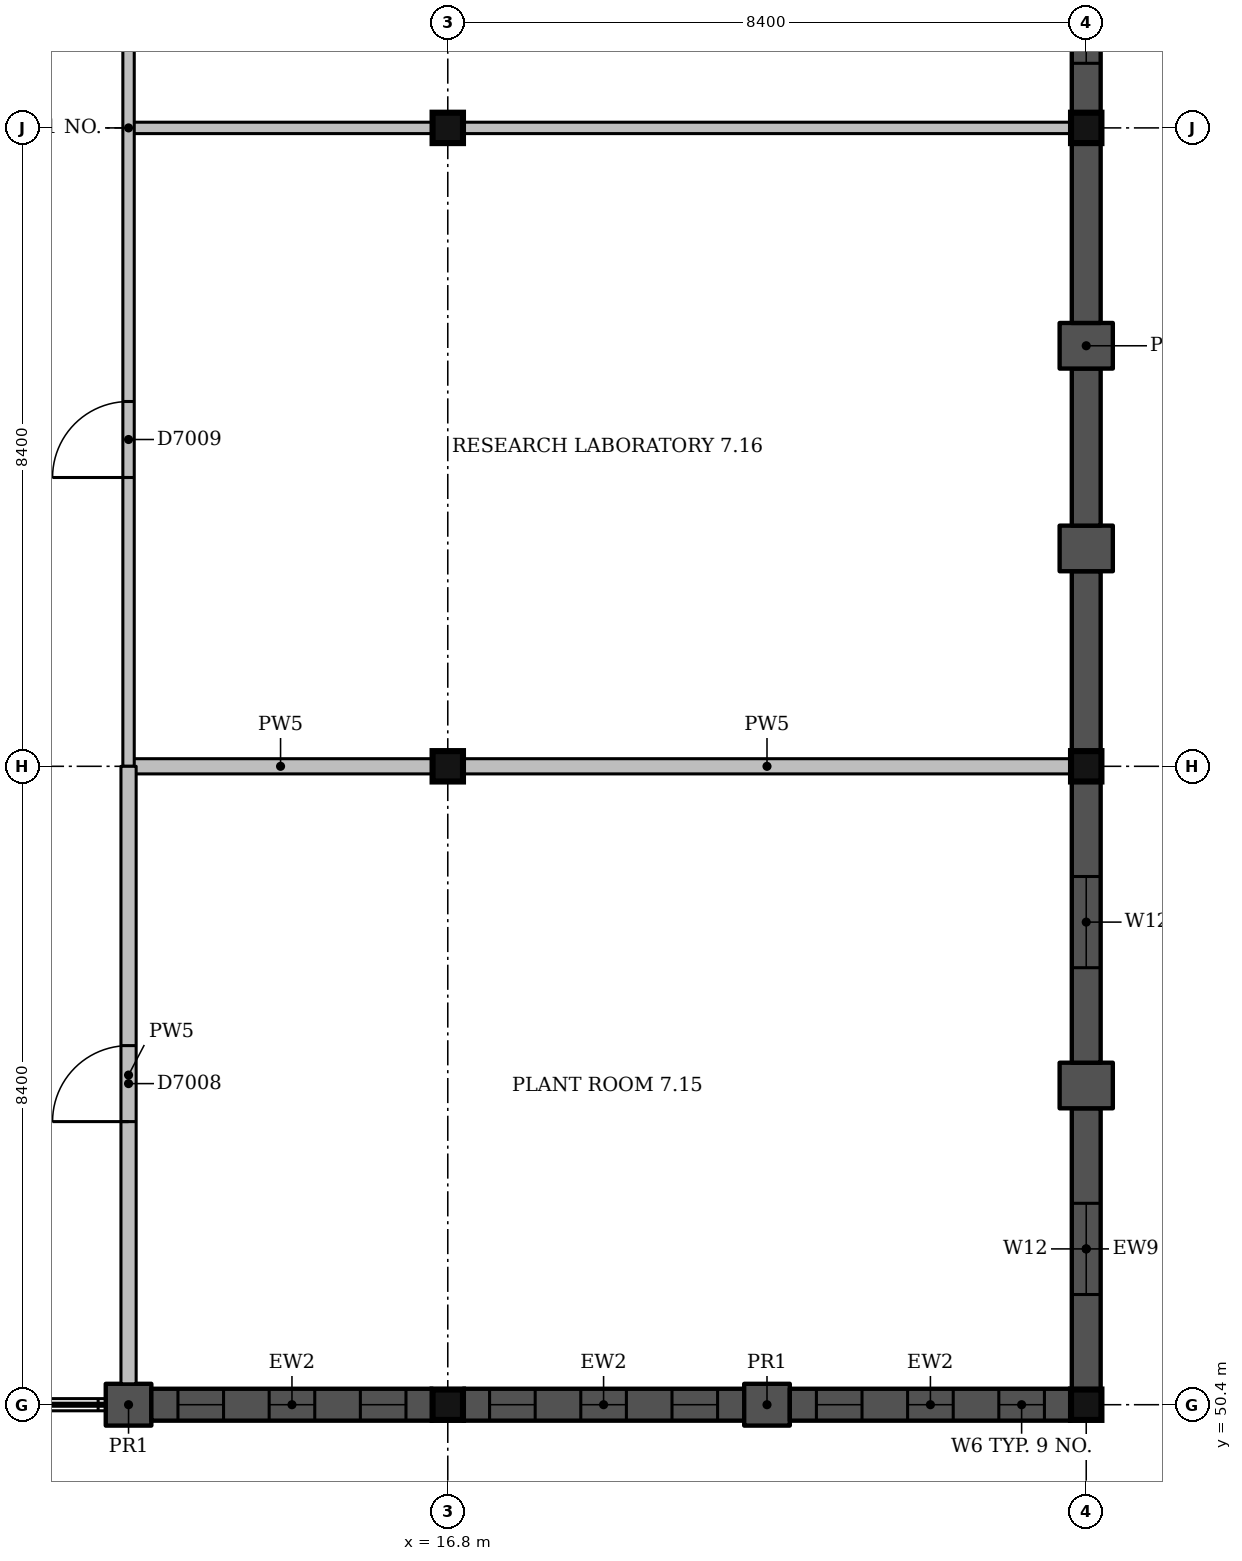
"""IFC4 building model, lengths in metres.
Left out: names, types, materials, properties, quantities, classifications, styles, units other than length and angle.
Written with IfcOpenShell. Run it as: python <this file> out.ifc"""

import sys

from ifc_helpers import new_model, si_unit, direction, frame, frame_2d, origin, origin_2d, place, context, subcontext, project, spatial, rectangle, extrude, element, fill, save


model = new_model("IFC4")
c1 = context("Model", 3, precision=1e-05, world=origin(), true_north=direction((0.0, 1.0)))
c2 = subcontext(c1, "Body", "Model", "MODEL_VIEW")
j1 = project(units=[si_unit("LENGTHUNIT", "METRE"), si_unit("PLANEANGLEUNIT", "RADIAN")], contexts=[c1])
p1 = place(None, origin())
s1 = spatial("IfcSite", under=j1, at=p1, CompositionType="ELEMENT")
p2 = place(p1, origin())
s2 = spatial("IfcBuilding", under=s1, at=p2, CompositionType="ELEMENT")
p3 = place(p2, frame((0.0, 0.0, 31.5)))
s3 = spatial("IfcBuildingStorey", under=s2, at=p3, CompositionType="ELEMENT", Elevation=31.5)
for number, where, z_axis, x_axis in (
    (1, (16.8, 50.4, 0.0), (0.0, 0.0, 1.0), (1.0, 0.0, 0.0)),
    (2, (16.8, 58.8, 0.0), (0.0, 0.0, 1.0), (1.0, 0.0, 0.0)),
    (3, (16.8, 67.2, 0.0), (0.0, 0.0, 1.0), (1.0, 0.0, 0.0)),
    (4, (25.2, 50.4, 0.0), (0.0, 0.0, 1.0), (1.0, 0.0, 0.0)),
    (5, (25.2, 58.8, 0.0), (0.0, 0.0, 1.0), (1.0, 0.0, 0.0)),
    (6, (25.2, 67.2, 0.0), (0.0, 0.0, 1.0), (1.0, 0.0, 0.0)),
):
    element("IfcColumn", number, at=place(p3, frame(where, z_axis=z_axis, x_axis=x_axis)), inside=s3, PredefinedType="COLUMN", context=c2, shape_type="SweptSolid", body=[
        extrude(rectangle(XDim=0.4, YDim=0.4, at=origin_2d()), origin(), (0.0, 0.0, 1.0), 4.5),
    ])
p4 = place(p3, frame((25.2, 50.6, 0.0), z_axis=(0.0, 0.0, 1.0), x_axis=(0.0, 1.0, 0.0)))
e7 = element("IfcWall", 7, at=p4, inside=s3, PredefinedType="SOLIDWALL", context=c2, shape_type="SweptSolid", body=[
    extrude(rectangle(XDim=3.7, YDim=0.38, at=frame_2d((1.85, 0.0))), origin(), (0.0, 0.0, 1.0), 4.2),
])
p5 = place(p4, frame((1.25, 0.0, 2.4)))
e8 = element("IfcOpeningElement", 8, at=p5, cuts=e7, PredefinedType="OPENING", context=c2, shape_type="SweptSolid", body=[
    extrude(rectangle(XDim=1.2, YDim=0.6, at=frame_2d((0.6, 0.3))), frame((0.0, 0.2, 0.0), z_axis=(0.0, -1.0, 0.0), x_axis=(1.0, 0.0, 0.0)), (0.0, 0.0, 1.0), 0.4),
])
p6 = place(p3, frame((25.2, 54.3, 0.0), z_axis=(0.0, 0.0, 1.0), x_axis=(0.0, 1.0, 0.0)))
e9 = element("IfcWall", 9, at=p6, inside=s3, PredefinedType="SOLIDWALL", context=c2, shape_type="SweptSolid", body=[
    extrude(rectangle(XDim=0.6, YDim=0.7, at=frame_2d((0.3, 0.0))), origin(), (0.0, 0.0, 1.0), 4.2),
])
p7 = place(p3, frame((25.2, 54.9, 0.0), z_axis=(0.0, 0.0, 1.0), x_axis=(0.0, 1.0, 0.0)))
e10 = element("IfcWall", 10, at=p7, inside=s3, PredefinedType="SOLIDWALL", context=c2, shape_type="SweptSolid", body=[
    extrude(rectangle(XDim=3.7, YDim=0.38, at=frame_2d((1.85, 0.0))), origin(), (0.0, 0.0, 1.0), 4.2),
])
p8 = place(p7, frame((1.25, 0.0, 2.4)))
e11 = element("IfcOpeningElement", 11, at=p8, cuts=e10, PredefinedType="OPENING", context=c2, shape_type="SweptSolid", body=[
    extrude(rectangle(XDim=1.2, YDim=0.6, at=frame_2d((0.6, 0.3))), frame((0.0, 0.2, 0.0), z_axis=(0.0, -1.0, 0.0), x_axis=(1.0, 0.0, 0.0)), (0.0, 0.0, 1.0), 0.4),
])
p9 = place(p3, frame((25.2, 59.0, 0.0), z_axis=(0.0, 0.0, 1.0), x_axis=(0.0, 1.0, 0.0)))
e12 = element("IfcWall", 12, at=p9, inside=s3, PredefinedType="SOLIDWALL", context=c2, shape_type="SweptSolid", body=[
    extrude(rectangle(XDim=2.367, YDim=0.38, at=frame_2d((1.183, 0.0))), origin(), (0.0, 0.0, 1.0), 3.6),
])
p10 = place(p3, frame((25.2, 61.367, 0.0), z_axis=(0.0, 0.0, 1.0), x_axis=(0.0, 1.0, 0.0)))
e13 = element("IfcWall", 13, at=p10, inside=s3, PredefinedType="SOLIDWALL", context=c2, shape_type="SweptSolid", body=[
    extrude(rectangle(XDim=0.6, YDim=0.7, at=frame_2d((0.3, 0.0))), origin(), (0.0, 0.0, 1.0), 3.6),
])
p11 = place(p3, frame((25.2, 61.967, 0.0), z_axis=(0.0, 0.0, 1.0), x_axis=(0.0, 1.0, 0.0)))
e14 = element("IfcWall", 14, at=p11, inside=s3, PredefinedType="SOLIDWALL", context=c2, shape_type="SweptSolid", body=[
    extrude(rectangle(XDim=2.066, YDim=0.38, at=frame_2d((1.033, 0.0))), origin(), (0.0, 0.0, 1.0), 3.6),
])
p12 = place(p3, frame((25.2, 64.033, 0.0), z_axis=(0.0, 0.0, 1.0), x_axis=(0.0, 1.0, 0.0)))
e15 = element("IfcWall", 15, at=p12, inside=s3, PredefinedType="SOLIDWALL", context=c2, shape_type="SweptSolid", body=[
    extrude(rectangle(XDim=0.6, YDim=0.7, at=frame_2d((0.3, 0.0))), origin(), (0.0, 0.0, 1.0), 3.6),
])
p13 = place(p3, frame((25.2, 64.633, 0.0), z_axis=(0.0, 0.0, 1.0), x_axis=(0.0, 1.0, 0.0)))
e16 = element("IfcWall", 16, at=p13, inside=s3, PredefinedType="SOLIDWALL", context=c2, shape_type="SweptSolid", body=[
    extrude(rectangle(XDim=2.367, YDim=0.38, at=frame_2d((1.183, 0.0))), origin(), (0.0, 0.0, 1.0), 3.6),
])
p14 = place(p3, frame((25.2, 67.4, 0.0), z_axis=(0.0, 0.0, 1.0), x_axis=(0.0, 1.0, 0.0)))
e17 = element("IfcWall", 17, at=p14, inside=s3, PredefinedType="SOLIDWALL", context=c2, shape_type="SweptSolid", body=[
    extrude(rectangle(XDim=3.7, YDim=0.38, at=frame_2d((1.85, 0.0))), origin(), (0.0, 0.0, 1.0), 3.6),
])
p15 = place(p14, frame((0.65, 0.0, 1.2)))
e18 = element("IfcOpeningElement", 18, at=p15, cuts=e17, PredefinedType="OPENING", context=c2, shape_type="SweptSolid", body=[
    extrude(rectangle(XDim=2.4, YDim=1.5, at=frame_2d((1.2, 0.75))), frame((0.0, 0.2, 0.0), z_axis=(0.0, -1.0, 0.0), x_axis=(1.0, 0.0, 0.0)), (0.0, 0.0, 1.0), 0.4),
])
p16 = place(p3, frame((12.3, 50.4, 0.0), z_axis=(0.0, 0.0, 1.0), x_axis=(1.0, 0.0, 0.0)))
e19 = element("IfcWall", 19, at=p16, inside=s3, PredefinedType="SOLIDWALL", context=c2, shape_type="SweptSolid", body=[
    extrude(rectangle(XDim=0.6, YDim=0.55, at=frame_2d((0.3, 0.0))), origin(), (0.0, 0.0, 1.0), 4.2),
])
p17 = place(p3, frame((12.9, 50.4, 0.0), z_axis=(0.0, 0.0, 1.0), x_axis=(1.0, 0.0, 0.0)))
e20 = element("IfcWall", 20, at=p17, inside=s3, PredefinedType="SOLIDWALL", context=c2, shape_type="SweptSolid", body=[
    extrude(rectangle(XDim=3.7, YDim=0.42, at=frame_2d((1.85, 0.0))), origin(), (0.0, 0.0, 1.0), 4.2),
])
p18 = place(p17, frame((0.35, 0.0, 1.0)))
e21 = element("IfcOpeningElement", 21, at=p18, cuts=e20, PredefinedType="OPENING", context=c2, shape_type="SweptSolid", body=[
    extrude(rectangle(XDim=0.6, YDim=2.1, at=frame_2d((0.3, 1.05))), frame((0.0, 0.22, 0.0), z_axis=(0.0, -1.0, 0.0), x_axis=(1.0, 0.0, 0.0)), (0.0, 0.0, 1.0), 0.44),
])
p19 = place(p17, frame((1.55, 0.0, 1.0)))
e22 = element("IfcOpeningElement", 22, at=p19, cuts=e20, PredefinedType="OPENING", context=c2, shape_type="SweptSolid", body=[
    extrude(rectangle(XDim=0.6, YDim=2.1, at=frame_2d((0.3, 1.05))), frame((0.0, 0.22, 0.0), z_axis=(0.0, -1.0, 0.0), x_axis=(1.0, 0.0, 0.0)), (0.0, 0.0, 1.0), 0.44),
])
p20 = place(p17, frame((2.75, 0.0, 1.0)))
e23 = element("IfcOpeningElement", 23, at=p20, cuts=e20, PredefinedType="OPENING", context=c2, shape_type="SweptSolid", body=[
    extrude(rectangle(XDim=0.6, YDim=2.1, at=frame_2d((0.3, 1.05))), frame((0.0, 0.22, 0.0), z_axis=(0.0, -1.0, 0.0), x_axis=(1.0, 0.0, 0.0)), (0.0, 0.0, 1.0), 0.44),
])
p21 = place(p3, frame((17.0, 50.4, 0.0), z_axis=(0.0, 0.0, 1.0), x_axis=(1.0, 0.0, 0.0)))
e24 = element("IfcWall", 24, at=p21, inside=s3, PredefinedType="SOLIDWALL", context=c2, shape_type="SweptSolid", body=[
    extrude(rectangle(XDim=3.7, YDim=0.42, at=frame_2d((1.85, 0.0))), origin(), (0.0, 0.0, 1.0), 3.6),
])
p22 = place(p21, frame((0.35, 0.0, 1.0)))
e25 = element("IfcOpeningElement", 25, at=p22, cuts=e24, PredefinedType="OPENING", context=c2, shape_type="SweptSolid", body=[
    extrude(rectangle(XDim=0.6, YDim=2.1, at=frame_2d((0.3, 1.05))), frame((0.0, 0.22, 0.0), z_axis=(0.0, -1.0, 0.0), x_axis=(1.0, 0.0, 0.0)), (0.0, 0.0, 1.0), 0.44),
])
p23 = place(p21, frame((1.55, 0.0, 1.0)))
e26 = element("IfcOpeningElement", 26, at=p23, cuts=e24, PredefinedType="OPENING", context=c2, shape_type="SweptSolid", body=[
    extrude(rectangle(XDim=0.6, YDim=2.1, at=frame_2d((0.3, 1.05))), frame((0.0, 0.22, 0.0), z_axis=(0.0, -1.0, 0.0), x_axis=(1.0, 0.0, 0.0)), (0.0, 0.0, 1.0), 0.44),
])
p24 = place(p21, frame((2.75, 0.0, 1.0)))
e27 = element("IfcOpeningElement", 27, at=p24, cuts=e24, PredefinedType="OPENING", context=c2, shape_type="SweptSolid", body=[
    extrude(rectangle(XDim=0.6, YDim=2.1, at=frame_2d((0.3, 1.05))), frame((0.0, 0.22, 0.0), z_axis=(0.0, -1.0, 0.0), x_axis=(1.0, 0.0, 0.0)), (0.0, 0.0, 1.0), 0.44),
])
p25 = place(p3, frame((20.7, 50.4, 0.0), z_axis=(0.0, 0.0, 1.0), x_axis=(1.0, 0.0, 0.0)))
e28 = element("IfcWall", 28, at=p25, inside=s3, PredefinedType="SOLIDWALL", context=c2, shape_type="SweptSolid", body=[
    extrude(rectangle(XDim=0.6, YDim=0.55, at=frame_2d((0.3, 0.0))), origin(), (0.0, 0.0, 1.0), 3.6),
])
p26 = place(p3, frame((21.3, 50.4, 0.0), z_axis=(0.0, 0.0, 1.0), x_axis=(1.0, 0.0, 0.0)))
e29 = element("IfcWall", 29, at=p26, inside=s3, PredefinedType="SOLIDWALL", context=c2, shape_type="SweptSolid", body=[
    extrude(rectangle(XDim=3.7, YDim=0.42, at=frame_2d((1.85, 0.0))), origin(), (0.0, 0.0, 1.0), 3.6),
])
p27 = place(p26, frame((0.35, 0.0, 1.0)))
e30 = element("IfcOpeningElement", 30, at=p27, cuts=e29, PredefinedType="OPENING", context=c2, shape_type="SweptSolid", body=[
    extrude(rectangle(XDim=0.6, YDim=2.1, at=frame_2d((0.3, 1.05))), frame((0.0, 0.22, 0.0), z_axis=(0.0, -1.0, 0.0), x_axis=(1.0, 0.0, 0.0)), (0.0, 0.0, 1.0), 0.44),
])
p28 = place(p26, frame((1.55, 0.0, 1.0)))
e31 = element("IfcOpeningElement", 31, at=p28, cuts=e29, PredefinedType="OPENING", context=c2, shape_type="SweptSolid", body=[
    extrude(rectangle(XDim=0.6, YDim=2.1, at=frame_2d((0.3, 1.05))), frame((0.0, 0.22, 0.0), z_axis=(0.0, -1.0, 0.0), x_axis=(1.0, 0.0, 0.0)), (0.0, 0.0, 1.0), 0.44),
])
p29 = place(p26, frame((2.75, 0.0, 1.0)))
e32 = element("IfcOpeningElement", 32, at=p29, cuts=e29, PredefinedType="OPENING", context=c2, shape_type="SweptSolid", body=[
    extrude(rectangle(XDim=0.6, YDim=2.1, at=frame_2d((0.3, 1.05))), frame((0.0, 0.22, 0.0), z_axis=(0.0, -1.0, 0.0), x_axis=(1.0, 0.0, 0.0)), (0.0, 0.0, 1.0), 0.44),
])
p30 = place(p3, frame((12.6, 58.8, 0.0), z_axis=(0.0, 0.0, 1.0), x_axis=(1.0, 0.0, 0.0)))
e33 = element("IfcWall", 33, at=p30, inside=s3, PredefinedType="PARTITIONING", context=c2, shape_type="SweptSolid", body=[
    extrude(rectangle(XDim=4.0, YDim=0.2, at=frame_2d((2.0, 0.0))), origin(), (0.0, 0.0, 1.0), 3.6),
])
p31 = place(p3, frame((17.0, 58.8, 0.0), z_axis=(0.0, 0.0, 1.0), x_axis=(1.0, 0.0, 0.0)))
e34 = element("IfcWall", 34, at=p31, inside=s3, PredefinedType="PARTITIONING", context=c2, shape_type="SweptSolid", body=[
    extrude(rectangle(XDim=8.0, YDim=0.2, at=frame_2d((4.0, 0.0))), origin(), (0.0, 0.0, 1.0), 3.6),
])
p32 = place(p3, frame((12.6, 67.2, 0.0), z_axis=(0.0, 0.0, 1.0), x_axis=(1.0, 0.0, 0.0)))
e35 = element("IfcWall", 35, at=p32, inside=s3, PredefinedType="PARTITIONING", context=c2, shape_type="SweptSolid", body=[
    extrude(rectangle(XDim=4.0, YDim=0.15, at=frame_2d((2.0, 0.0))), origin(), (0.0, 0.0, 1.0), 3.6),
])
p33 = place(p3, frame((17.0, 67.2, 0.0), z_axis=(0.0, 0.0, 1.0), x_axis=(1.0, 0.0, 0.0)))
e36 = element("IfcWall", 36, at=p33, inside=s3, PredefinedType="PARTITIONING", context=c2, shape_type="SweptSolid", body=[
    extrude(rectangle(XDim=8.0, YDim=0.15, at=frame_2d((4.0, 0.0))), origin(), (0.0, 0.0, 1.0), 3.6),
])
p34 = place(p3, frame((12.6, 58.8, 0.0), z_axis=(0.0, 0.0, 1.0), x_axis=(0.0, 1.0, 0.0)))
e37 = element("IfcWall", 37, at=p34, inside=s3, PredefinedType="PARTITIONING", context=c2, shape_type="SweptSolid", body=[
    extrude(rectangle(XDim=16.8, YDim=0.15, at=frame_2d((8.4, 0.0))), origin(), (0.0, 0.0, 1.0), 3.6),
])
p35 = place(p34, frame((3.8, 0.0, 0.0)))
e38 = element("IfcOpeningElement", 38, at=p35, cuts=e37, PredefinedType="OPENING", context=c2, shape_type="SweptSolid", body=[
    extrude(rectangle(XDim=1.0, YDim=2.1, at=frame_2d((0.5, 1.05))), frame((0.0, 0.085, 0.0), z_axis=(0.0, -1.0, 0.0), x_axis=(1.0, 0.0, 0.0)), (0.0, 0.0, 1.0), 0.17),
])
p36 = place(p3, frame((12.6, 50.675, 0.0), z_axis=(0.0, 0.0, 1.0), x_axis=(0.0, 1.0, 0.0)))
e39 = element("IfcWall", 39, at=p36, inside=s3, PredefinedType="PARTITIONING", context=c2, shape_type="SweptSolid", body=[
    extrude(rectangle(XDim=8.125, YDim=0.2, at=frame_2d((4.062, 0.0))), origin(), (0.0, 0.0, 1.0), 3.6),
])
p37 = place(p36, frame((3.45, 0.0, 0.0)))
e40 = element("IfcOpeningElement", 40, at=p37, cuts=e39, PredefinedType="OPENING", context=c2, shape_type="SweptSolid", body=[
    extrude(rectangle(XDim=1.0, YDim=2.1, at=frame_2d((0.5, 1.05))), frame((0.0, 0.11, 0.0), z_axis=(0.0, -1.0, 0.0), x_axis=(1.0, 0.0, 0.0)), (0.0, 0.0, 1.0), 0.22),
])
p38 = place(p5, origin())
e41 = element("IfcWindow", 41, at=p38, inside=s3, PartitioningType="SINGLE_PANEL", PredefinedType="WINDOW", context=c2, shape_type="SweptSolid", body=[
    extrude(rectangle(XDim=1.2, YDim=0.6, at=frame_2d((0.6, 0.3))), frame((0.0, 0.15, 0.0), z_axis=(0.0, -1.0, 0.0), x_axis=(1.0, 0.0, 0.0)), (0.0, 0.0, 1.0), 0.06),
])
fill(e8, e41)
p39 = place(p8, origin())
e42 = element("IfcWindow", 42, at=p39, inside=s3, PartitioningType="SINGLE_PANEL", PredefinedType="WINDOW", context=c2, shape_type="SweptSolid", body=[
    extrude(rectangle(XDim=1.2, YDim=0.6, at=frame_2d((0.6, 0.3))), frame((0.0, 0.15, 0.0), z_axis=(0.0, -1.0, 0.0), x_axis=(1.0, 0.0, 0.0)), (0.0, 0.0, 1.0), 0.06),
])
fill(e11, e42)
p40 = place(p15, origin())
e43 = element("IfcWindow", 43, at=p40, inside=s3, PartitioningType="SINGLE_PANEL", PredefinedType="WINDOW", context=c2, shape_type="SweptSolid", body=[
    extrude(rectangle(XDim=2.4, YDim=1.5, at=frame_2d((1.2, 0.75))), frame((0.0, 0.15, 0.0), z_axis=(0.0, -1.0, 0.0), x_axis=(1.0, 0.0, 0.0)), (0.0, 0.0, 1.0), 0.06),
])
fill(e18, e43)
p41 = place(p18, origin())
e44 = element("IfcWindow", 44, at=p41, inside=s3, PartitioningType="SINGLE_PANEL", PredefinedType="WINDOW", context=c2, shape_type="SweptSolid", body=[
    extrude(rectangle(XDim=0.6, YDim=2.1, at=frame_2d((0.3, 1.05))), frame((0.0, 0.15, 0.0), z_axis=(0.0, -1.0, 0.0), x_axis=(1.0, 0.0, 0.0)), (0.0, 0.0, 1.0), 0.06),
])
fill(e21, e44)
p42 = place(p19, origin())
e45 = element("IfcWindow", 45, at=p42, inside=s3, PartitioningType="SINGLE_PANEL", PredefinedType="WINDOW", context=c2, shape_type="SweptSolid", body=[
    extrude(rectangle(XDim=0.6, YDim=2.1, at=frame_2d((0.3, 1.05))), frame((0.0, 0.15, 0.0), z_axis=(0.0, -1.0, 0.0), x_axis=(1.0, 0.0, 0.0)), (0.0, 0.0, 1.0), 0.06),
])
fill(e22, e45)
p43 = place(p20, origin())
e46 = element("IfcWindow", 46, at=p43, inside=s3, PartitioningType="SINGLE_PANEL", PredefinedType="WINDOW", context=c2, shape_type="SweptSolid", body=[
    extrude(rectangle(XDim=0.6, YDim=2.1, at=frame_2d((0.3, 1.05))), frame((0.0, 0.15, 0.0), z_axis=(0.0, -1.0, 0.0), x_axis=(1.0, 0.0, 0.0)), (0.0, 0.0, 1.0), 0.06),
])
fill(e23, e46)
p44 = place(p22, origin())
e47 = element("IfcWindow", 47, at=p44, inside=s3, PartitioningType="SINGLE_PANEL", PredefinedType="WINDOW", context=c2, shape_type="SweptSolid", body=[
    extrude(rectangle(XDim=0.6, YDim=2.1, at=frame_2d((0.3, 1.05))), frame((0.0, 0.15, 0.0), z_axis=(0.0, -1.0, 0.0), x_axis=(1.0, 0.0, 0.0)), (0.0, 0.0, 1.0), 0.06),
])
fill(e25, e47)
p45 = place(p23, origin())
e48 = element("IfcWindow", 48, at=p45, inside=s3, PartitioningType="SINGLE_PANEL", PredefinedType="WINDOW", context=c2, shape_type="SweptSolid", body=[
    extrude(rectangle(XDim=0.6, YDim=2.1, at=frame_2d((0.3, 1.05))), frame((0.0, 0.15, 0.0), z_axis=(0.0, -1.0, 0.0), x_axis=(1.0, 0.0, 0.0)), (0.0, 0.0, 1.0), 0.06),
])
fill(e26, e48)
p46 = place(p24, origin())
e49 = element("IfcWindow", 49, at=p46, inside=s3, PartitioningType="SINGLE_PANEL", PredefinedType="WINDOW", context=c2, shape_type="SweptSolid", body=[
    extrude(rectangle(XDim=0.6, YDim=2.1, at=frame_2d((0.3, 1.05))), frame((0.0, 0.15, 0.0), z_axis=(0.0, -1.0, 0.0), x_axis=(1.0, 0.0, 0.0)), (0.0, 0.0, 1.0), 0.06),
])
fill(e27, e49)
p47 = place(p27, origin())
e50 = element("IfcWindow", 50, at=p47, inside=s3, PartitioningType="SINGLE_PANEL", PredefinedType="WINDOW", context=c2, shape_type="SweptSolid", body=[
    extrude(rectangle(XDim=0.6, YDim=2.1, at=frame_2d((0.3, 1.05))), frame((0.0, 0.15, 0.0), z_axis=(0.0, -1.0, 0.0), x_axis=(1.0, 0.0, 0.0)), (0.0, 0.0, 1.0), 0.06),
])
fill(e30, e50)
p48 = place(p28, origin())
e51 = element("IfcWindow", 51, at=p48, inside=s3, PartitioningType="SINGLE_PANEL", PredefinedType="WINDOW", context=c2, shape_type="SweptSolid", body=[
    extrude(rectangle(XDim=0.6, YDim=2.1, at=frame_2d((0.3, 1.05))), frame((0.0, 0.15, 0.0), z_axis=(0.0, -1.0, 0.0), x_axis=(1.0, 0.0, 0.0)), (0.0, 0.0, 1.0), 0.06),
])
fill(e31, e51)
p49 = place(p29, origin())
e52 = element("IfcWindow", 52, at=p49, inside=s3, PartitioningType="SINGLE_PANEL", PredefinedType="WINDOW", context=c2, shape_type="SweptSolid", body=[
    extrude(rectangle(XDim=0.6, YDim=2.1, at=frame_2d((0.3, 1.05))), frame((0.0, 0.15, 0.0), z_axis=(0.0, -1.0, 0.0), x_axis=(1.0, 0.0, 0.0)), (0.0, 0.0, 1.0), 0.06),
])
fill(e32, e52)
p50 = place(p37, origin())
e53 = element("IfcDoor", 53, at=p50, inside=s3, OperationType="SINGLE_SWING_LEFT", PredefinedType="DOOR", context=c2, shape_type="SweptSolid", body=[
    extrude(rectangle(XDim=1.0, YDim=2.1, at=frame_2d((0.5, 1.05))), frame((0.0, 0.025, 0.0), z_axis=(0.0, -1.0, 0.0), x_axis=(1.0, 0.0, 0.0)), (0.0, 0.0, 1.0), 0.05),
])
fill(e40, e53)
p51 = place(p35, origin())
e54 = element("IfcDoor", 54, at=p51, inside=s3, OperationType="SINGLE_SWING_LEFT", PredefinedType="DOOR", context=c2, shape_type="SweptSolid", body=[
    extrude(rectangle(XDim=1.0, YDim=2.1, at=frame_2d((0.5, 1.05))), frame((0.0, 0.025, 0.0), z_axis=(0.0, -1.0, 0.0), x_axis=(1.0, 0.0, 0.0)), (0.0, 0.0, 1.0), 0.05),
])
fill(e38, e54)
save(model, sys.argv[1])
